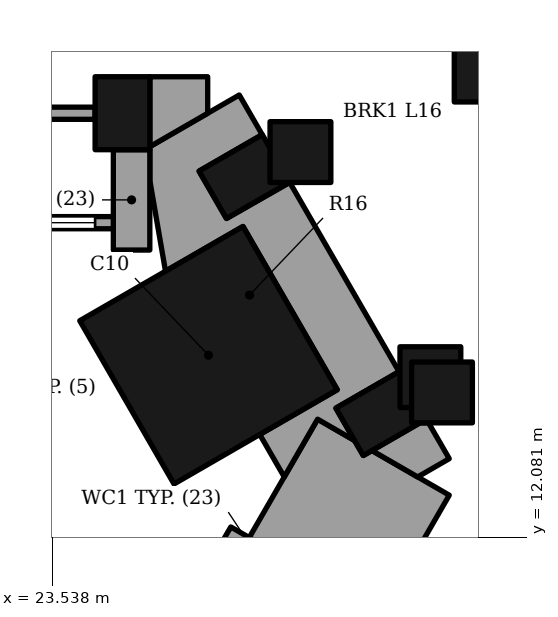
"""IFC4 building model, lengths in metres.
Left out: names, types, materials, properties, quantities, classifications, styles, units other than length and angle.
Written with IfcOpenShell. Run it as: python <this file> out.ifc"""

import sys

from ifc_helpers import new_model, si_unit, direction, frame, frame_2d, origin, origin_2d, place, context, subcontext, project, spatial, polyline, rectangle, outline, extrude, element, fill, save


model = new_model("IFC4")
c1 = context("Model", 3, precision=1e-05, world=origin(), true_north=direction((0.0, 1.0)))
c2 = subcontext(c1, "Body", "Model", "MODEL_VIEW")
j1 = project(units=[si_unit("LENGTHUNIT", "METRE"), si_unit("PLANEANGLEUNIT", "RADIAN")], contexts=[c1])
p1 = place(None, origin())
s1 = spatial("IfcSite", under=j1, at=p1, CompositionType="ELEMENT")
p2 = place(p1, origin())
s2 = spatial("IfcBuilding", under=s1, at=p2, CompositionType="ELEMENT")
p3 = place(p2, frame((0.0, 0.0, 76.6)))
s3 = spatial("IfcBuildingStorey", under=s2, at=p3, CompositionType="ELEMENT", Elevation=76.6)
p4 = place(p3, frame((26.107, 15.073, 0.0), z_axis=(0.0, 0.0, 1.0), x_axis=(-0.866025447418, -0.499999924425, 0.0)))
e1 = element("IfcColumn", 1, at=p4, inside=s3, PredefinedType="COLUMN", context=c2, shape_type="SweptSolid", body=[
    extrude(rectangle(XDim=3.1, YDim=3.1, at=origin_2d()), origin(), (0.0, 0.0, 1.0), 3.4),
])
for number, where, z_axis, x_axis in (
    (2, (28.947, 14.113, 0.0), (0.0, 0.0, 1.0), (-0.5, 0.866, 0.0)),
    (3, (26.697, 18.011, 0.0), (0.0, 0.0, 1.0), (-0.5, 0.866, 0.0)),
    (4, (24.692, 19.053, 0.0), (0.0, 0.0, 1.0), (-1.0, 0.0, 0.0)),
):
    element("IfcColumn", number, at=place(p3, frame(where, z_axis=z_axis, x_axis=x_axis)), inside=s3, PredefinedType="COLUMN", context=c2, shape_type="SweptSolid", body=[
        extrude(rectangle(XDim=0.9, YDim=1.2, at=origin_2d()), origin(), (0.0, 0.0, 1.0), 3.4),
    ])
p5 = place(p3, frame((27.753, 11.164, 0.0), z_axis=(0.0, 0.0, 1.0), x_axis=(-0.866040211805, 0.499974350878, 0.0)))
e5 = element("IfcWall", 5, at=p5, inside=s3, PredefinedType="SOLIDWALL", context=c2, shape_type="SweptSolid", body=[
    extrude(rectangle(XDim=1.65, YDim=0.6, at=frame_2d((0.825, 0.0))), origin(), (0.0, 0.0, 1.0), 2.65),
])
p6 = place(p3, origin())
e6 = element("IfcWall", 6, at=p6, inside=s3, PredefinedType="SOLIDWALL", context=c2, shape_type="SweptSolid", body=[
    extrude(outline(polyline([(25.142, 16.802), (25.142, 18.453), (24.542, 18.453), (24.542, 16.802), (25.142, 16.802)])), origin(), (0.0, 0.0, 1.0), 2.63),
])
p7 = place(p3, frame((24.242, 19.052, 0.0), z_axis=(0.0, 0.0, 1.0), x_axis=(-1.0, 0.0, 0.0)))
e7 = element("IfcWall", 7, at=p7, inside=s3, PredefinedType="SOLIDWALL", context=c2, shape_type="SweptSolid", body=[
    extrude(rectangle(XDim=3.6, YDim=0.2, at=frame_2d((1.8, 0.0))), origin(), (0.0, 0.0, 1.0), 2.65),
])
p8 = place(p3, frame((24.542, 17.252, 0.0), z_axis=(0.0, 0.0, 1.0), x_axis=(-1.0, 0.0, 0.0)))
e8 = element("IfcWall", 8, at=p8, inside=s3, PredefinedType="ELEMENTEDWALL", context=c2, shape_type="SweptSolid", body=[
    extrude(rectangle(XDim=4.2, YDim=0.2, at=frame_2d((2.1, 0.0))), origin(), (0.0, 0.0, 1.0), 2.65),
])
p9 = place(p8, frame((0.3, 0.0, 0.6)))
e9 = element("IfcOpeningElement", 9, at=p9, cuts=e8, PredefinedType="OPENING", context=c2, shape_type="SweptSolid", body=[
    extrude(rectangle(XDim=2.1, YDim=1.8, at=frame_2d((1.05, 0.9))), frame((0.0, 0.11, 0.0), z_axis=(0.0, -1.0, 0.0), x_axis=(1.0, 0.0, 0.0)), (0.0, 0.0, 1.0), 0.22),
])
p10 = place(p8, frame((2.7, 0.0, 0.0)))
e10 = element("IfcOpeningElement", 10, at=p10, cuts=e8, PredefinedType="OPENING", context=c2, shape_type="SweptSolid", body=[
    extrude(rectangle(XDim=1.2, YDim=2.4, at=frame_2d((0.6, 1.2))), frame((0.0, 0.11, 0.0), z_axis=(0.0, -1.0, 0.0), x_axis=(1.0, 0.0, 0.0)), (0.0, 0.0, 1.0), 0.22),
])
p11 = place(p3, origin())
e11 = element("IfcWall", 11, at=p11, inside=s3, PredefinedType="SOLIDWALL", context=c2, shape_type="SweptSolid", body=[
    extrude(outline(polyline([(30.066, 12.771), (28.795, 13.506), (28.652, 13.423), (28.51, 13.67), (27.901, 14.021), (26.777, 12.074), (28.942, 10.824), (30.066, 12.771)])), origin(), (0.0, 0.0, 1.0), 2.63),
])
p12 = place(p3, origin())
e12 = element("IfcWall", 12, at=p12, inside=s3, PredefinedType="SOLIDWALL", context=c2, shape_type="SweptSolid", body=[
    extrude(outline(polyline([(29.726, 13.961), (29.584, 13.961), (28.777, 13.495), (28.795, 13.506), (29.547, 13.072), (30.066, 13.372), (29.726, 13.961)])), origin(), (0.0, 0.0, 1.0), 2.63),
])
p13 = place(p3, origin())
e13 = element("IfcWall", 13, at=p13, inside=s3, PredefinedType="SOLIDWALL", context=c2, shape_type="SweptSolid", body=[
    extrude(outline(polyline([(26.674, 17.19), (28.224, 14.506), (26.95, 13.77), (27.353, 13.072), (27.901, 14.021), (28.51, 13.67), (28.202, 14.203), (29.24, 14.802), (27.444, 17.914), (26.402, 17.321), (25.952, 18.101), (26.99, 18.7), (26.613, 19.353), (25.054, 18.453), (25.142, 18.453), (25.142, 17.947), (25.4, 16.454), (26.674, 17.19)])), origin(), (0.0, 0.0, 1.0), 2.63),
])
p14 = place(p3, origin())
e14 = element("IfcWall", 14, at=p14, inside=s3, PredefinedType="SOLIDWALL", context=c2, shape_type="SweptSolid", body=[
    extrude(outline(polyline([(26.094, 19.653), (25.142, 19.653), (25.142, 18.503), (26.094, 19.052), (26.094, 19.653)])), origin(), (0.0, 0.0, 1.0), 2.63),
])
p15 = place(p9, origin())
e15 = element("IfcWindow", 15, at=p15, inside=s3, PartitioningType="SINGLE_PANEL", PredefinedType="WINDOW", context=c2, shape_type="SweptSolid", body=[
    extrude(rectangle(XDim=2.1, YDim=1.8, at=frame_2d((1.05, 0.9))), frame((0.0, 0.03, 0.0), z_axis=(0.0, -1.0, 0.0), x_axis=(1.0, 0.0, 0.0)), (0.0, 0.0, 1.0), 0.06),
])
fill(e9, e15)
save(model, sys.argv[1])
